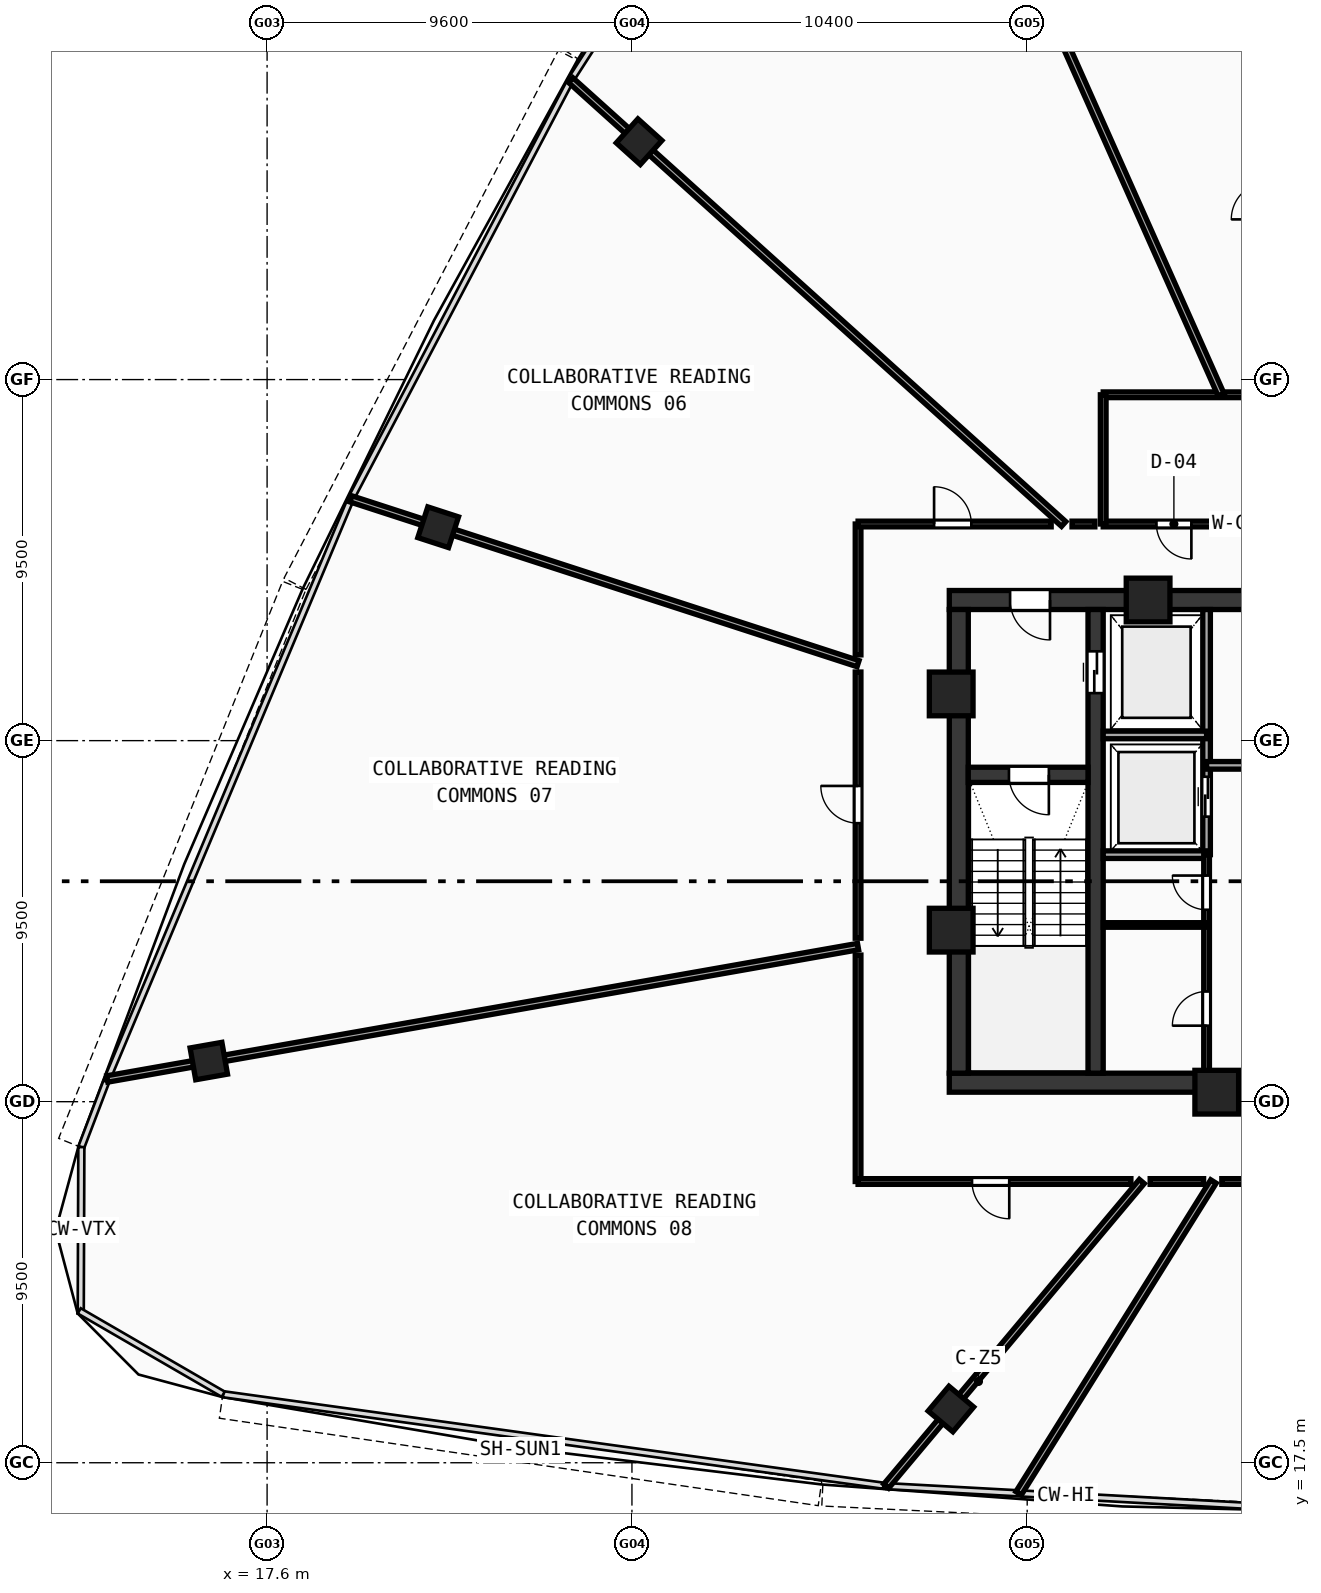
"""IFC4 building model, lengths in metres.
Left out: names, types, materials, properties, quantities, classifications, styles, units other than length and angle.
Written with IfcOpenShell. Run it as: python <this file> out.ifc"""

import sys

from ifc_helpers import new_model, si_unit, direction, frame, frame_2d, origin, origin_with_axes, origin_2d, place, context, subcontext, project, spatial, rectangle, hollow_rectangle, extrude, source, transform, mapped, element, fill, save


model = new_model("IFC4")
c1 = context("Model", 3, precision=1e-05, world=origin(), true_north=direction((0.0, 1.0)))
c2 = subcontext(c1, "Body", "Model", "MODEL_VIEW")
j1 = project(units=[si_unit("LENGTHUNIT", "METRE"), si_unit("PLANEANGLEUNIT", "RADIAN")], contexts=[c1])
p1 = place(None, origin())
s1 = spatial("IfcSite", under=j1, at=p1, CompositionType="ELEMENT")
p2 = place(p1, origin())
s2 = spatial("IfcBuilding", under=s1, at=p2, CompositionType="ELEMENT")
p3 = place(p2, frame((0.0, 0.0, 240.8)))
s3 = spatial("IfcBuildingStorey", under=s2, at=p3, CompositionType="ELEMENT", Elevation=240.8)
p4 = place(p3, frame((35.55, 27.5, 0.0), z_axis=(0.0, 0.0, 1.0), x_axis=(1.0, 0.0, 0.0)))
e1 = element("IfcWall", 1, at=p4, inside=s3, PredefinedType="SHEAR", context=c2, shape_type="SweptSolid", body=[
    extrude(rectangle(XDim=24.9, YDim=0.5, at=frame_2d((12.45, 0.0))), origin(), (0.0, 0.0, 1.0), 3.47),
])
p5 = place(p3, frame((35.55, 40.2, 0.0), z_axis=(0.0, 0.0, 1.0), x_axis=(1.0, 0.0, 0.0)))
e2 = element("IfcWall", 2, at=p5, inside=s3, PredefinedType="SHEAR", context=c2, shape_type="SweptSolid", body=[
    extrude(rectangle(XDim=11.25, YDim=0.5, at=frame_2d((5.625, 0.0))), origin(), (0.0, 0.0, 1.0), 3.47),
])
p6 = place(p5, frame((1.6, 0.0, 0.0)))
e3 = element("IfcOpeningElement", 3, at=p6, cuts=e2, PredefinedType="OPENING", context=c2, shape_type="SweptSolid", body=[
    extrude(rectangle(XDim=1.05, YDim=2.1, at=frame_2d((0.525, 1.05))), frame((0.0, 0.26, 0.0), z_axis=(0.0, -1.0, 0.0), x_axis=(1.0, 0.0, 0.0)), (0.0, 0.0, 1.0), 0.52),
])
p7 = place(p3, frame((35.8, 27.75, 0.0), z_axis=(0.0, 0.0, 1.0), x_axis=(0.0, 1.0, 0.0)))
e4 = element("IfcWall", 4, at=p7, inside=s3, PredefinedType="SHEAR", context=c2, shape_type="SweptSolid", body=[
    extrude(rectangle(XDim=12.2, YDim=0.5, at=frame_2d((6.1, 0.0))), origin(), (0.0, 0.0, 1.0), 3.47),
])
p8 = place(p3, frame((39.4, 27.75, 0.0), z_axis=(0.0, 0.0, 1.0), x_axis=(0.0, 1.0, 0.0)))
e5 = element("IfcWall", 5, at=p8, inside=s3, PredefinedType="SHEAR", context=c2, shape_type="SweptSolid", body=[
    extrude(rectangle(XDim=12.2, YDim=0.4, at=frame_2d((6.1, 0.0))), origin(), (0.0, 0.0, 1.0), 3.47),
])
p9 = place(p8, frame((10.0, 0.0, 0.0)))
e6 = element("IfcOpeningElement", 6, at=p9, cuts=e5, PredefinedType="OPENING", context=c2, shape_type="SweptSolid", body=[
    extrude(rectangle(XDim=1.1, YDim=2.1, at=frame_2d((0.55, 1.05))), frame((0.0, 0.21, 0.0), z_axis=(0.0, -1.0, 0.0), x_axis=(1.0, 0.0, 0.0)), (0.0, 0.0, 1.0), 0.42),
])
p10 = place(p3, frame((36.05, 35.6, 0.0), z_axis=(0.0, 0.0, 1.0), x_axis=(1.0, 0.0, 0.0)))
e7 = element("IfcWall", 7, at=p10, inside=s3, PredefinedType="SHEAR", context=c2, shape_type="SweptSolid", body=[
    extrude(rectangle(XDim=3.15, YDim=0.4, at=frame_2d((1.575, 0.0))), origin(), (0.0, 0.0, 1.0), 3.47),
])
p11 = place(p10, frame((1.07, 0.0, 0.0)))
e8 = element("IfcOpeningElement", 8, at=p11, cuts=e7, PredefinedType="OPENING", context=c2, shape_type="SweptSolid", body=[
    extrude(rectangle(XDim=1.05, YDim=2.1, at=frame_2d((0.525, 1.05))), frame((0.0, 0.21, 0.0), z_axis=(0.0, -1.0, 0.0), x_axis=(1.0, 0.0, 0.0)), (0.0, 0.0, 1.0), 0.42),
])
m1 = source(origin(), c2, "Body", "SweptSolid", [
    extrude(hollow_rectangle(XDim=1.15, YDim=1.15, WallThickness=0.048, at=origin_2d()), origin(), (0.0, 0.0, 1.0), 3.73),
])
for number, where, z_axis, x_axis in (
    (9, (42.588, 27.25, -0.26), (0.0, 0.0, 1.0), (1.0, 0.0, 0.0)),
    (10, (40.781, 40.2, -0.26), (0.0, 0.0, 1.0), (1.0, 0.0, 0.0)),
    (11, (35.6, 37.729, -0.26), (0.0, 0.0, 1.0), (1.0, 0.0, 0.0)),
    (12, (35.6, 31.513, -0.26), (0.0, 0.0, 1.0), (1.0, 0.0, 0.0)),
):
    element("IfcColumn", number, at=place(p3, frame(where, z_axis=z_axis, x_axis=x_axis)), inside=s3, PredefinedType="COLUMN", context=c2, shape_type="MappedRepresentation", body=[
        mapped(m1, transform((0.0, 0.0, 0.0), scale=1.0)),
    ])
m2 = source(origin(), c2, "Body", "SweptSolid", [
    extrude(hollow_rectangle(XDim=0.85, YDim=0.85, WallThickness=0.034, at=origin_2d()), origin(), (0.0, 0.0, 1.0), 3.73),
])
for number, where, z_axis, x_axis in (
    (13, (35.593, 18.914, -0.26), (0.0, 0.0, 1.0), (0.766, -0.643, 0.0)),
    (14, (27.388, 52.259, -0.26), (0.0, 0.0, 1.0), (-0.669, -0.743, 0.0)),
    (15, (22.102, 42.115, -0.26), (0.0, 0.0, 1.0), (-0.309, -0.951, 0.0)),
    (16, (16.066, 28.069, -0.26), (0.0, 0.0, 1.0), (0.174, -0.985, 0.0)),
):
    element("IfcColumn", number, at=place(p3, frame(where, z_axis=z_axis, x_axis=x_axis)), inside=s3, PredefinedType="COLUMN", context=c2, shape_type="MappedRepresentation", body=[
        mapped(m2, transform((0.0, 0.0, 0.0), scale=1.0)),
    ])
p12 = place(p3, frame((42.32, 33.5, 0.0), z_axis=(0.0, 0.0, 1.0), x_axis=(0.0, 1.0, 0.0)))
e17 = element("IfcWall", 17, at=p12, inside=s3, PredefinedType="SOLIDWALL", context=c2, shape_type="SweptSolid", body=[
    extrude(rectangle(XDim=6.45, YDim=0.2, at=frame_2d((3.225, 0.0))), origin(), (0.0, 0.0, 1.0), 3.47),
])
p13 = place(p12, frame((1.0, 0.0, 0.0)))
e18 = element("IfcOpeningElement", 18, at=p13, cuts=e17, PredefinedType="OPENING", context=c2, shape_type="SweptSolid", body=[
    extrude(rectangle(XDim=1.05, YDim=2.1, at=frame_2d((0.525, 1.05))), frame((0.0, 0.11, 0.0), z_axis=(0.0, -1.0, 0.0), x_axis=(1.0, 0.0, 0.0)), (0.0, 0.0, 1.0), 0.22),
])
for number, where, z_axis, x_axis in (
    (19, (39.6, 36.65, 0.0), (0.0, 0.0, 1.0), (1.0, 0.0, 0.0)),
    (20, (39.6, 33.5, 0.0), (0.0, 0.0, 1.0), (1.0, 0.0, 0.0)),
):
    element("IfcWall", number, at=place(p3, frame(where, z_axis=z_axis, x_axis=x_axis)), inside=s3, PredefinedType="SOLIDWALL", context=c2, shape_type="SweptSolid", body=[
        extrude(rectangle(XDim=2.72, YDim=0.2, at=frame_2d((1.36, 0.0))), origin(), (0.0, 0.0, 1.0), 3.47),
    ])
p14 = place(p3, frame((42.32, 35.85, 0.0), z_axis=(0.0, 0.0, 1.0), x_axis=(1.0, 0.0, 0.0)))
e21 = element("IfcWall", 21, at=p14, inside=s3, PredefinedType="SOLIDWALL", context=c2, shape_type="SweptSolid", body=[
    extrude(rectangle(XDim=4.73, YDim=0.2, at=frame_2d((2.365, 0.0))), origin(), (0.0, 0.0, 1.0), 3.47),
])
p15 = place(p14, frame((1.8, 0.0, 0.0)))
e22 = element("IfcOpeningElement", 22, at=p15, cuts=e21, PredefinedType="OPENING", context=c2, shape_type="SweptSolid", body=[
    extrude(rectangle(XDim=0.9, YDim=2.1, at=frame_2d((0.45, 1.05))), frame((0.0, 0.11, 0.0), z_axis=(0.0, -1.0, 0.0), x_axis=(1.0, 0.0, 0.0)), (0.0, 0.0, 1.0), 0.22),
])
p16 = place(p3, frame((42.32, 27.6, 0.0), z_axis=(0.0, 0.0, 1.0), x_axis=(0.0, 1.0, 0.0)))
e23 = element("IfcWall", 23, at=p16, inside=s3, PredefinedType="PARTITIONING", context=c2, shape_type="SweptSolid", body=[
    extrude(rectangle(XDim=5.9, YDim=0.15, at=frame_2d((2.95, 0.0))), origin(), (0.0, 0.0, 1.0), 3.47),
])
p17 = place(p16, frame((1.4, 0.0, 0.0)))
e24 = element("IfcOpeningElement", 24, at=p17, cuts=e23, PredefinedType="OPENING", context=c2, shape_type="SweptSolid", body=[
    extrude(rectangle(XDim=0.9, YDim=2.1, at=frame_2d((0.45, 1.05))), frame((0.0, 0.085, 0.0), z_axis=(0.0, -1.0, 0.0), x_axis=(1.0, 0.0, 0.0)), (0.0, 0.0, 1.0), 0.17),
])
p18 = place(p16, frame((4.45, 0.0, 0.0)))
e25 = element("IfcOpeningElement", 25, at=p18, cuts=e23, PredefinedType="OPENING", context=c2, shape_type="SweptSolid", body=[
    extrude(rectangle(XDim=0.9, YDim=2.1, at=frame_2d((0.45, 1.05))), frame((0.0, 0.085, 0.0), z_axis=(0.0, -1.0, 0.0), x_axis=(1.0, 0.0, 0.0)), (0.0, 0.0, 1.0), 0.17),
])
p19 = place(p3, frame((39.6, 31.65, 0.0), z_axis=(0.0, 0.0, 1.0), x_axis=(1.0, 0.0, 0.0)))
e26 = element("IfcWall", 26, at=p19, inside=s3, PredefinedType="PARTITIONING", context=c2, shape_type="SweptSolid", body=[
    extrude(rectangle(XDim=2.72, YDim=0.12, at=frame_2d((1.36, 0.0))), origin(), (0.0, 0.0, 1.0), 3.47),
])
p20 = place(p3, frame((39.6, 42.2, 0.0), z_axis=(0.0, 0.0, 1.0), x_axis=(1.0, 0.0, 0.0)))
e27 = element("IfcWall", 27, at=p20, inside=s3, PredefinedType="PARTITIONING", context=c2, shape_type="SweptSolid", body=[
    extrude(rectangle(XDim=4.35, YDim=0.15, at=frame_2d((2.175, 0.0))), origin(), (0.0, 0.0, 1.0), 3.47),
])
p21 = place(p20, frame((1.4, 0.0, 0.0)))
e28 = element("IfcOpeningElement", 28, at=p21, cuts=e27, PredefinedType="OPENING", context=c2, shape_type="SweptSolid", body=[
    extrude(rectangle(XDim=0.92, YDim=2.1, at=frame_2d((0.46, 1.05))), frame((0.0, 0.085, 0.0), z_axis=(0.0, -1.0, 0.0), x_axis=(1.0, 0.0, 0.0)), (0.0, 0.0, 1.0), 0.17),
])
p22 = place(p3, frame((39.6, 45.6, 0.0), z_axis=(0.0, 0.0, 1.0), x_axis=(1.0, 0.0, 0.0)))
e29 = element("IfcWall", 29, at=p22, inside=s3, PredefinedType="PARTITIONING", context=c2, shape_type="SweptSolid", body=[
    extrude(rectangle(XDim=4.35, YDim=0.15, at=frame_2d((2.175, 0.0))), origin(), (0.0, 0.0, 1.0), 2.82),
])
p23 = place(p3, frame((39.6, 42.2, 0.0), z_axis=(0.0, 0.0, 1.0), x_axis=(0.0, 1.0, 0.0)))
e30 = element("IfcWall", 30, at=p23, inside=s3, PredefinedType="PARTITIONING", context=c2, shape_type="SweptSolid", body=[
    extrude(rectangle(XDim=3.4, YDim=0.15, at=frame_2d((1.7, 0.0))), origin(), (0.0, 0.0, 1.0), 3.47),
])
p24 = place(p3, frame((42.702, 45.6, 0.0), z_axis=(0.0, 0.0, 1.0), x_axis=(-0.406745472033, 0.913541526686, 0.0)))
e31 = element("IfcWall", 31, at=p24, inside=s3, PredefinedType="PARTITIONING", context=c2, shape_type="SweptSolid", body=[
    extrude(rectangle(XDim=22.574, YDim=0.17, at=frame_2d((11.287, 0.0))), origin(), (0.0, 0.0, 1.0), 2.82),
])
p25 = place(p3, frame((38.56, 42.2, 0.0), z_axis=(0.0, 0.0, 1.0), x_axis=(-0.743140424774, 0.669135493802, 0.0)))
e32 = element("IfcWall", 32, at=p25, inside=s3, PredefinedType="PARTITIONING", context=c2, shape_type="SweptSolid", body=[
    extrude(rectangle(XDim=17.455, YDim=0.17, at=frame_2d((8.728, 0.0))), origin(), (0.0, 0.0, 1.0), 2.82),
])
p26 = place(p3, frame((33.15, 38.525, 0.0), z_axis=(0.0, 0.0, 1.0), x_axis=(-0.951060404644, 0.309005027011, 0.0)))
e33 = element("IfcWall", 33, at=p26, inside=s3, PredefinedType="PARTITIONING", context=c2, shape_type="SweptSolid", body=[
    extrude(rectangle(XDim=14.032, YDim=0.17, at=frame_2d((7.016, 0.0))), origin(), (0.0, 0.0, 1.0), 2.82),
])
p27 = place(p3, frame((33.15, 31.082, 0.0), z_axis=(0.0, 0.0, 1.0), x_axis=(-0.984808421785, -0.173644384824, 0.0)))
e34 = element("IfcWall", 34, at=p27, inside=s3, PredefinedType="PARTITIONING", context=c2, shape_type="SweptSolid", body=[
    extrude(rectangle(XDim=20.059, YDim=0.17, at=frame_2d((10.03, 0.0))), origin(), (0.0, 0.0, 1.0), 2.82),
])
p28 = place(p3, frame((40.616, 24.9, 0.0), z_axis=(0.0, 0.0, 1.0), x_axis=(-0.642788120563, -0.766044014443, 0.0)))
e35 = element("IfcWall", 35, at=p28, inside=s3, PredefinedType="PARTITIONING", context=c2, shape_type="SweptSolid", body=[
    extrude(rectangle(XDim=10.462, YDim=0.17, at=frame_2d((5.231, 0.0))), origin(), (0.0, 0.0, 1.0), 2.82),
])
p29 = place(p3, frame((42.501, 24.9, 0.0), z_axis=(0.0, 0.0, 1.0), x_axis=(-0.529930889386, -0.848040831844, 0.0)))
e36 = element("IfcWall", 36, at=p29, inside=s3, PredefinedType="PARTITIONING", context=c2, shape_type="SweptSolid", body=[
    extrude(rectangle(XDim=9.675, YDim=0.17, at=frame_2d((4.837, 0.0))), origin(), (0.0, 0.0, 1.0), 2.82),
])
p30 = place(p3, frame((33.15, 24.9, 0.0), z_axis=(0.0, 0.0, 1.0), x_axis=(0.0, 1.0, 0.0)))
e37 = element("IfcWall", 37, at=p30, inside=s3, PredefinedType="PARTITIONING", context=c2, shape_type="SweptSolid", body=[
    extrude(rectangle(XDim=5.958, YDim=0.15, at=frame_2d((2.979, 0.0))), origin(), (0.0, 0.0, 1.0), 3.12),
])
p31 = place(p3, frame((33.15, 31.301, 0.0), z_axis=(0.0, 0.0, 1.0), x_axis=(0.0, 1.0, 0.0)))
e38 = element("IfcWall", 38, at=p31, inside=s3, PredefinedType="PARTITIONING", context=c2, shape_type="SweptSolid", body=[
    extrude(rectangle(XDim=7.004, YDim=0.15, at=frame_2d((3.502, 0.0))), origin(), (0.0, 0.0, 1.0), 3.47),
])
p32 = place(p31, frame((3.027, 0.0, 0.0)))
e39 = element("IfcOpeningElement", 39, at=p32, cuts=e38, PredefinedType="OPENING", context=c2, shape_type="SweptSolid", body=[
    extrude(rectangle(XDim=0.98, YDim=2.12, at=frame_2d((0.49, 1.06))), frame((0.0, 0.085, 0.0), z_axis=(0.0, -1.0, 0.0), x_axis=(1.0, 0.0, 0.0)), (0.0, 0.0, 1.0), 0.17),
])
p33 = place(p3, frame((33.15, 38.756, 0.0), z_axis=(0.0, 0.0, 1.0), x_axis=(0.0, 1.0, 0.0)))
e40 = element("IfcWall", 40, at=p33, inside=s3, PredefinedType="PARTITIONING", context=c2, shape_type="SweptSolid", body=[
    extrude(rectangle(XDim=3.444, YDim=0.15, at=frame_2d((1.722, 0.0))), origin(), (0.0, 0.0, 1.0), 3.12),
])
p34 = place(p3, frame((33.15, 42.2, 0.0), z_axis=(0.0, 0.0, 1.0), x_axis=(1.0, 0.0, 0.0)))
e41 = element("IfcWall", 41, at=p34, inside=s3, PredefinedType="PARTITIONING", context=c2, shape_type="SweptSolid", body=[
    extrude(rectangle(XDim=5.081, YDim=0.15, at=frame_2d((2.541, 0.0))), origin(), (0.0, 0.0, 1.0), 3.12),
])
p35 = place(p34, frame((2.0, 0.0, 0.0)))
e42 = element("IfcOpeningElement", 42, at=p35, cuts=e41, PredefinedType="OPENING", context=c2, shape_type="SweptSolid", body=[
    extrude(rectangle(XDim=0.98, YDim=2.12, at=frame_2d((0.49, 1.06))), frame((0.0, 0.085, 0.0), z_axis=(0.0, -1.0, 0.0), x_axis=(1.0, 0.0, 0.0)), (0.0, 0.0, 1.0), 0.17),
])
p36 = place(p3, frame((38.78, 42.2, 0.0), z_axis=(0.0, 0.0, 1.0), x_axis=(1.0, 0.0, 0.0)))
e43 = element("IfcWall", 43, at=p36, inside=s3, PredefinedType="PARTITIONING", context=c2, shape_type="SweptSolid", body=[
    extrude(rectangle(XDim=0.6, YDim=0.15, at=frame_2d((0.3, 0.0))), origin(), (0.0, 0.0, 1.0), 2.82),
])
p37 = place(p3, frame((50.138, 24.9, 0.0), z_axis=(0.0, 0.0, 1.0), x_axis=(-1.0, 0.0, 0.0)))
e44 = element("IfcWall", 44, at=p37, inside=s3, PredefinedType="PARTITIONING", context=c2, shape_type="SweptSolid", body=[
    extrude(rectangle(XDim=7.417, YDim=0.15, at=frame_2d((3.708, 0.0))), origin(), (0.0, 0.0, 1.0), 2.82),
])
p38 = place(p37, frame((3.234, 0.0, 0.0)))
e45 = element("IfcOpeningElement", 45, at=p38, cuts=e44, PredefinedType="OPENING", context=c2, shape_type="SweptSolid", body=[
    extrude(rectangle(XDim=0.98, YDim=2.12, at=frame_2d((0.49, 1.06))), frame((0.0, 0.085, 0.0), z_axis=(0.0, -1.0, 0.0), x_axis=(1.0, 0.0, 0.0)), (0.0, 0.0, 1.0), 0.17),
])
p39 = place(p3, frame((42.242, 24.9, 0.0), z_axis=(0.0, 0.0, 1.0), x_axis=(-1.0, 0.0, 0.0)))
e46 = element("IfcWall", 46, at=p39, inside=s3, PredefinedType="PARTITIONING", context=c2, shape_type="SweptSolid", body=[
    extrude(rectangle(XDim=1.406, YDim=0.15, at=frame_2d((0.703, 0.0))), origin(), (0.0, 0.0, 1.0), 2.82),
])
p40 = place(p3, frame((40.329, 24.9, 0.0), z_axis=(0.0, 0.0, 1.0), x_axis=(-1.0, 0.0, 0.0)))
e47 = element("IfcWall", 47, at=p40, inside=s3, PredefinedType="PARTITIONING", context=c2, shape_type="SweptSolid", body=[
    extrude(rectangle(XDim=7.179, YDim=0.15, at=frame_2d((3.589, 0.0))), origin(), (0.0, 0.0, 1.0), 3.12),
])
p41 = place(p40, frame((3.201, 0.0, 0.0)))
e48 = element("IfcOpeningElement", 48, at=p41, cuts=e47, PredefinedType="OPENING", context=c2, shape_type="SweptSolid", body=[
    extrude(rectangle(XDim=0.98, YDim=2.12, at=frame_2d((0.49, 1.06))), frame((0.0, 0.085, 0.0), z_axis=(0.0, -1.0, 0.0), x_axis=(1.0, 0.0, 0.0)), (0.0, 0.0, 1.0), 0.17),
])
m3 = source(origin(), c2, "Body", "SweptSolid", [
    extrude(rectangle(XDim=1.05, YDim=2.1, at=frame_2d((0.525, 1.05))), frame((0.0, 0.025, 0.0), z_axis=(0.0, -1.0, 0.0), x_axis=(1.0, 0.0, 0.0)), (0.0, 0.0, 1.0), 0.05),
])
p42 = place(p11, frame((1.05, 0.0, 0.0), z_axis=(0.0, 0.0, 1.0), x_axis=(-1.0, 0.0, 0.0)))
e49 = element("IfcDoor", 49, at=p42, inside=s3, OperationType="SINGLE_SWING_LEFT", PredefinedType="DOOR", context=c2, shape_type="MappedRepresentation", body=[
    mapped(m3, transform((0.0, 0.0, 0.0), scale=1.0)),
])
fill(e8, e49)
p43 = place(p6, frame((1.05, 0.0, 0.0), z_axis=(0.0, 0.0, 1.0), x_axis=(-1.0, 0.0, 0.0)))
e50 = element("IfcDoor", 50, at=p43, inside=s3, OperationType="SINGLE_SWING_LEFT", PredefinedType="DOOR", context=c2, shape_type="MappedRepresentation", body=[
    mapped(m3, transform((0.0, 0.0, 0.0), scale=1.0)),
])
fill(e3, e50)
m4 = source(origin(), c2, "Body", "SweptSolid", [
    extrude(rectangle(XDim=1.1, YDim=2.1, at=frame_2d((0.55, 1.05))), frame((0.0, 0.025, 0.0), z_axis=(0.0, -1.0, 0.0), x_axis=(1.0, 0.0, 0.0)), (0.0, 0.0, 1.0), 0.05),
])
p44 = place(p9, frame((1.1, 0.0, 0.0), z_axis=(0.0, 0.0, 1.0), x_axis=(-1.0, 0.0, 0.0)))
e51 = element("IfcDoor", 51, at=p44, inside=s3, OperationType="DOUBLE_DOOR_SLIDING", PredefinedType="DOOR", context=c2, shape_type="MappedRepresentation", body=[
    mapped(m4, transform((0.0, 0.0, 0.0), scale=1.0)),
])
fill(e6, e51)
p45 = place(p13, origin_with_axes())
e52 = element("IfcDoor", 52, at=p45, inside=s3, OperationType="DOUBLE_DOOR_SLIDING", PredefinedType="DOOR", context=c2, shape_type="MappedRepresentation", body=[
    mapped(m3, transform((0.0, 0.0, 0.0), scale=1.0)),
])
fill(e18, e52)
m5 = source(origin(), c2, "Body", "SweptSolid", [
    extrude(rectangle(XDim=0.9, YDim=2.1, at=frame_2d((0.45, 1.05))), frame((0.0, 0.025, 0.0), z_axis=(0.0, -1.0, 0.0), x_axis=(1.0, 0.0, 0.0)), (0.0, 0.0, 1.0), 0.05),
])
p46 = place(p17, origin_with_axes())
e53 = element("IfcDoor", 53, at=p46, inside=s3, OperationType="SINGLE_SWING_LEFT", PredefinedType="DOOR", context=c2, shape_type="MappedRepresentation", body=[
    mapped(m5, transform((0.0, 0.0, 0.0), scale=1.0)),
])
fill(e24, e53)
p47 = place(p18, origin_with_axes())
e54 = element("IfcDoor", 54, at=p47, inside=s3, OperationType="SINGLE_SWING_RIGHT", PredefinedType="DOOR", context=c2, shape_type="MappedRepresentation", body=[
    mapped(m5, transform((0.0, 0.0, 0.0), scale=1.0)),
])
fill(e25, e54)
m6 = source(origin(), c2, "Body", "SweptSolid", [
    extrude(rectangle(XDim=0.92, YDim=2.1, at=frame_2d((0.46, 1.05))), frame((0.0, 0.025, 0.0), z_axis=(0.0, -1.0, 0.0), x_axis=(1.0, 0.0, 0.0)), (0.0, 0.0, 1.0), 0.05),
])
p48 = place(p21, frame((0.92, 0.0, 0.0), z_axis=(0.0, 0.0, 1.0), x_axis=(-1.0, 0.0, 0.0)))
e55 = element("IfcDoor", 55, at=p48, inside=s3, OperationType="SINGLE_SWING_LEFT", PredefinedType="DOOR", context=c2, shape_type="MappedRepresentation", body=[
    mapped(m6, transform((0.0, 0.0, 0.0), scale=1.0)),
])
fill(e28, e55)
m7 = source(origin(), c2, "Body", "SweptSolid", [
    extrude(rectangle(XDim=0.98, YDim=2.12, at=frame_2d((0.49, 1.06))), frame((0.0, 0.025, 0.0), z_axis=(0.0, -1.0, 0.0), x_axis=(1.0, 0.0, 0.0)), (0.0, 0.0, 1.0), 0.05),
])
p49 = place(p35, origin_with_axes())
e56 = element("IfcDoor", 56, at=p49, inside=s3, OperationType="SINGLE_SWING_LEFT", PredefinedType="DOOR", context=c2, shape_type="MappedRepresentation", body=[
    mapped(m7, transform((0.0, 0.0, 0.0), scale=1.0)),
])
fill(e42, e56)
p50 = place(p32, origin_with_axes())
e57 = element("IfcDoor", 57, at=p50, inside=s3, OperationType="SINGLE_SWING_RIGHT", PredefinedType="DOOR", context=c2, shape_type="MappedRepresentation", body=[
    mapped(m7, transform((0.0, 0.0, 0.0), scale=1.0)),
])
fill(e39, e57)
p51 = place(p41, origin_with_axes())
e58 = element("IfcDoor", 58, at=p51, inside=s3, OperationType="SINGLE_SWING_LEFT", PredefinedType="DOOR", context=c2, shape_type="MappedRepresentation", body=[
    mapped(m7, transform((0.0, 0.0, 0.0), scale=1.0)),
])
fill(e48, e58)
save(model, sys.argv[1])
